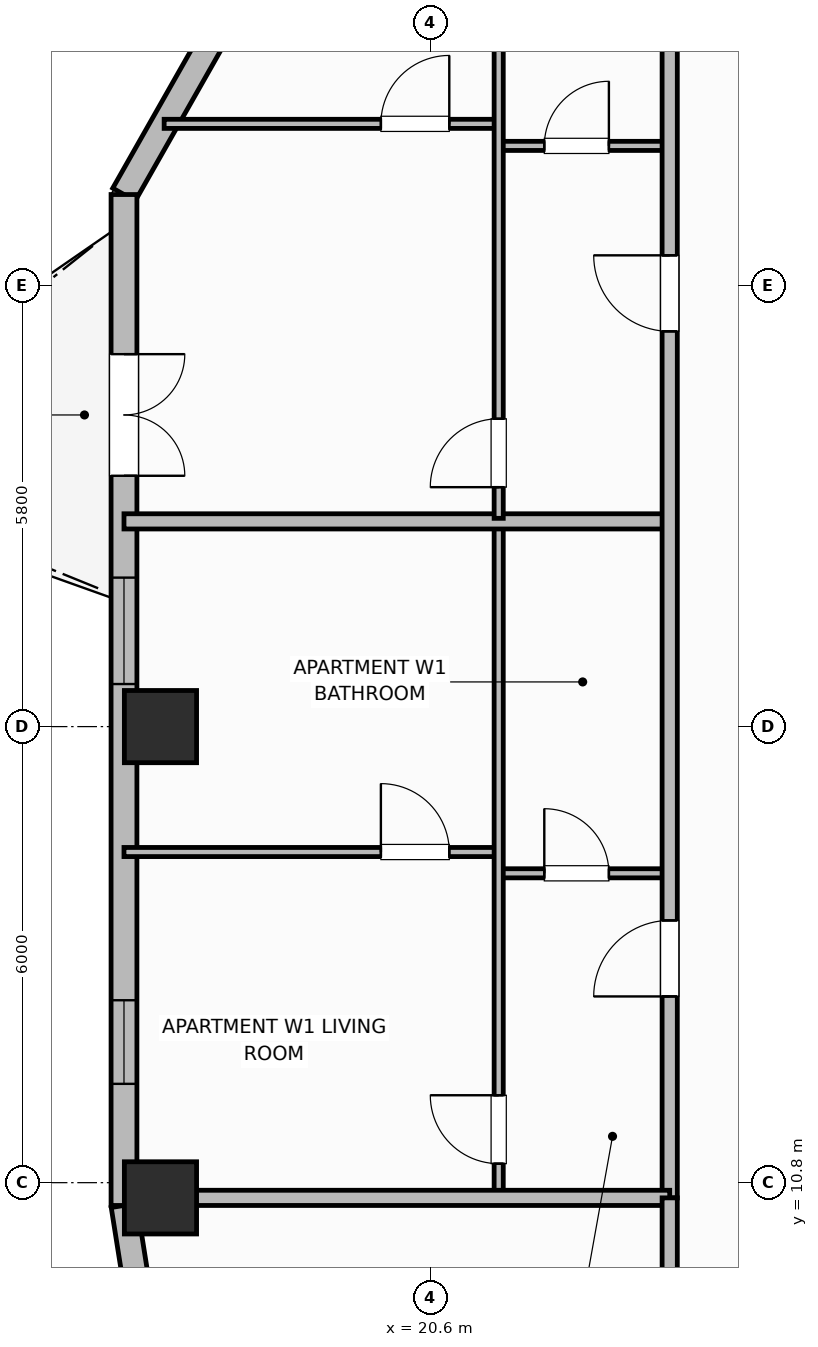
"""IFC4 building model, lengths in metres.
Left out: names, types, materials, properties, quantities, classifications, styles, units other than length and angle.
Written with IfcOpenShell. Run it as: python <this file> out.ifc"""

import sys

from ifc_helpers import new_model, si_unit, direction, frame, frame_2d, origin, origin_2d, place, context, subcontext, project, spatial, rectangle, extrude, element, fill, save


model = new_model("IFC4")
c1 = context("Model", 3, precision=1e-05, world=origin(), true_north=direction((0.0, 1.0)))
c2 = subcontext(c1, "Body", "Model", "MODEL_VIEW")
j1 = project(units=[si_unit("LENGTHUNIT", "METRE"), si_unit("PLANEANGLEUNIT", "RADIAN")], contexts=[c1])
p1 = place(None, origin())
s1 = spatial("IfcSite", under=j1, at=p1, CompositionType="ELEMENT")
p2 = place(p1, origin())
s2 = spatial("IfcBuilding", under=s1, at=p2, CompositionType="ELEMENT")
p3 = place(p2, frame((0.0, 0.0, 173.7)))
s3 = spatial("IfcBuildingStorey", under=s2, at=p3, CompositionType="ELEMENT", Elevation=173.7)
for number, where, z_axis, x_axis in (
    (1, (17.05, 10.6, 0.0), (0.0, 0.0, 1.0), (1.0, 0.0, 0.0)),
    (2, (17.05, 16.8, 0.0), (0.0, 0.0, 1.0), (1.0, 0.0, 0.0)),
):
    element("IfcColumn", number, at=place(p3, frame(where, z_axis=z_axis, x_axis=x_axis)), inside=s3, PredefinedType="COLUMN", context=c2, shape_type="SweptSolid", body=[
        extrude(rectangle(XDim=0.95, YDim=0.95, at=origin_2d()), origin(), (0.0, 0.0, 1.0), 3.7),
    ])
p4 = place(p3, frame((16.57, 10.5, 0.0), z_axis=(0.0, 0.0, 1.0), x_axis=(0.156514556949, -0.987675651954, 0.0)))
e3 = element("IfcWall", 3, at=p4, inside=s3, PredefinedType="SOLIDWALL", context=c2, shape_type="SweptSolid", body=[
    extrude(rectangle(XDim=1.135, YDim=0.34, at=frame_2d((0.568, 0.0))), origin(), (0.0, 0.0, 1.0), 2.72),
])
p5 = place(p3, frame((17.82, 26.0, 0.0), z_axis=(0.0, 0.0, 1.0), x_axis=(-0.494017696272, -0.869451847873, 0.0)))
e4 = element("IfcWall", 4, at=p5, inside=s3, PredefinedType="SOLIDWALL", context=c2, shape_type="SweptSolid", body=[
    extrude(rectangle(XDim=2.53, YDim=0.34, at=frame_2d((1.265, 0.0))), origin(), (0.0, 0.0, 1.0), 2.72),
])
p6 = place(p3, frame((16.57, 23.8, 0.0), z_axis=(0.0, 0.0, 1.0), x_axis=(0.0, -1.0, 0.0)))
e5 = element("IfcWall", 5, at=p6, inside=s3, PredefinedType="SOLIDWALL", context=c2, shape_type="SweptSolid", body=[
    extrude(rectangle(XDim=13.3, YDim=0.34, at=frame_2d((6.65, 0.0))), origin(), (0.0, 0.0, 1.0), 2.72),
])
p7 = place(p6, frame((2.1, 0.0, 0.0)))
e6 = element("IfcOpeningElement", 6, at=p7, cuts=e5, PredefinedType="OPENING", context=c2, shape_type="SweptSolid", body=[
    extrude(rectangle(XDim=1.6, YDim=2.1, at=frame_2d((0.8, 1.05))), frame((0.0, 0.18, 0.0), z_axis=(0.0, -1.0, 0.0), x_axis=(1.0, 0.0, 0.0)), (0.0, 0.0, 1.0), 0.36),
])
p8 = place(p6, frame((5.04, 0.0, 0.71)))
e7 = element("IfcOpeningElement", 7, at=p8, cuts=e5, PredefinedType="OPENING", context=c2, shape_type="SweptSolid", body=[
    extrude(rectangle(XDim=1.4, YDim=1.85, at=frame_2d((0.7, 0.925))), frame((0.0, 0.18, 0.0), z_axis=(0.0, -1.0, 0.0), x_axis=(1.0, 0.0, 0.0)), (0.0, 0.0, 1.0), 0.36),
])
p9 = place(p6, frame((10.6, 0.0, 0.95)))
e8 = element("IfcOpeningElement", 8, at=p9, cuts=e5, PredefinedType="OPENING", context=c2, shape_type="SweptSolid", body=[
    extrude(rectangle(XDim=1.1, YDim=1.65, at=frame_2d((0.55, 0.825))), frame((0.0, 0.18, 0.0), z_axis=(0.0, -1.0, 0.0), x_axis=(1.0, 0.0, 0.0)), (0.0, 0.0, 1.0), 0.36),
])
p10 = place(p3, frame((21.5, 14.87, 0.0), z_axis=(0.0, 0.0, 1.0), x_axis=(1.0, 0.0, 0.0)))
e9 = element("IfcWall", 9, at=p10, inside=s3, PredefinedType="PARTITIONING", context=c2, shape_type="SweptSolid", body=[
    extrude(rectangle(XDim=2.25, YDim=0.12, at=frame_2d((1.125, 0.0))), origin(), (0.0, 0.0, 1.0), 2.55),
])
p11 = place(p10, frame((0.6, 0.0, 0.0)))
e10 = element("IfcOpeningElement", 10, at=p11, cuts=e9, PredefinedType="OPENING", context=c2, shape_type="SweptSolid", body=[
    extrude(rectangle(XDim=0.85, YDim=2.1, at=frame_2d((0.425, 1.05))), frame((0.0, 0.07, 0.0), z_axis=(0.0, -1.0, 0.0), x_axis=(1.0, 0.0, 0.0)), (0.0, 0.0, 1.0), 0.14),
])
p12 = place(p3, frame((16.57, 15.15, 0.0), z_axis=(0.0, 0.0, 1.0), x_axis=(1.0, 0.0, 0.0)))
e11 = element("IfcWall", 11, at=p12, inside=s3, PredefinedType="PARTITIONING", context=c2, shape_type="SweptSolid", body=[
    extrude(rectangle(XDim=4.93, YDim=0.12, at=frame_2d((2.465, 0.0))), origin(), (0.0, 0.0, 1.0), 2.55),
])
p13 = place(p12, frame((3.38, 0.0, 0.0)))
e12 = element("IfcOpeningElement", 12, at=p13, cuts=e11, PredefinedType="OPENING", context=c2, shape_type="SweptSolid", body=[
    extrude(rectangle(XDim=0.9, YDim=2.1, at=frame_2d((0.45, 1.05))), frame((0.0, 0.07, 0.0), z_axis=(0.0, -1.0, 0.0), x_axis=(1.0, 0.0, 0.0)), (0.0, 0.0, 1.0), 0.14),
])
p14 = place(p3, frame((21.5, 10.64, 0.0), z_axis=(0.0, 0.0, 1.0), x_axis=(0.0, 1.0, 0.0)))
e13 = element("IfcWall", 13, at=p14, inside=s3, PredefinedType="PARTITIONING", context=c2, shape_type="SweptSolid", body=[
    extrude(rectangle(XDim=8.82, YDim=0.12, at=frame_2d((4.41, 0.0))), origin(), (0.0, 0.0, 1.0), 2.55),
])
p15 = place(p14, frame((0.41, 0.0, 0.0)))
e14 = element("IfcOpeningElement", 14, at=p15, cuts=e13, PredefinedType="OPENING", context=c2, shape_type="SweptSolid", body=[
    extrude(rectangle(XDim=0.9, YDim=2.1, at=frame_2d((0.45, 1.05))), frame((0.0, 0.07, 0.0), z_axis=(0.0, -1.0, 0.0), x_axis=(1.0, 0.0, 0.0)), (0.0, 0.0, 1.0), 0.14),
])
p16 = place(p3, frame((16.57, 19.5, 0.0), z_axis=(0.0, 0.0, 1.0), x_axis=(1.0, 0.0, 0.0)))
e15 = element("IfcWall", 15, at=p16, inside=s3, PredefinedType="PARTITIONING", context=c2, shape_type="SweptSolid", body=[
    extrude(rectangle(XDim=7.18, YDim=0.2, at=frame_2d((3.59, 0.0))), origin(), (0.0, 0.0, 1.0), 2.55),
])
p17 = place(p3, frame((21.5, 24.44, 0.0), z_axis=(0.0, 0.0, 1.0), x_axis=(1.0, 0.0, 0.0)))
e16 = element("IfcWall", 16, at=p17, inside=s3, PredefinedType="PARTITIONING", context=c2, shape_type="SweptSolid", body=[
    extrude(rectangle(XDim=2.25, YDim=0.12, at=frame_2d((1.125, 0.0))), origin(), (0.0, 0.0, 1.0), 2.55),
])
p18 = place(p17, frame((0.6, 0.0, 0.0)))
e17 = element("IfcOpeningElement", 17, at=p18, cuts=e16, PredefinedType="OPENING", context=c2, shape_type="SweptSolid", body=[
    extrude(rectangle(XDim=0.85, YDim=2.1, at=frame_2d((0.425, 1.05))), frame((0.0, 0.07, 0.0), z_axis=(0.0, -1.0, 0.0), x_axis=(1.0, 0.0, 0.0)), (0.0, 0.0, 1.0), 0.14),
])
p19 = place(p3, frame((17.098, 24.73, 0.0), z_axis=(0.0, 0.0, 1.0), x_axis=(1.0, 0.0, 0.0)))
e18 = element("IfcWall", 18, at=p19, inside=s3, PredefinedType="PARTITIONING", context=c2, shape_type="SweptSolid", body=[
    extrude(rectangle(XDim=4.402, YDim=0.12, at=frame_2d((2.201, 0.0))), origin(), (0.0, 0.0, 1.0), 2.55),
])
p20 = place(p19, frame((2.852, 0.0, 0.0)))
e19 = element("IfcOpeningElement", 19, at=p20, cuts=e18, PredefinedType="OPENING", context=c2, shape_type="SweptSolid", body=[
    extrude(rectangle(XDim=0.9, YDim=2.1, at=frame_2d((0.45, 1.05))), frame((0.0, 0.07, 0.0), z_axis=(0.0, -1.0, 0.0), x_axis=(1.0, 0.0, 0.0)), (0.0, 0.0, 1.0), 0.14),
])
p21 = place(p3, frame((21.5, 19.54, 0.0), z_axis=(0.0, 0.0, 1.0), x_axis=(0.0, 1.0, 0.0)))
e20 = element("IfcWall", 20, at=p21, inside=s3, PredefinedType="PARTITIONING", context=c2, shape_type="SweptSolid", body=[
    extrude(rectangle(XDim=10.22, YDim=0.12, at=frame_2d((5.11, 0.0))), origin(), (0.0, 0.0, 1.0), 2.55),
])
p22 = place(p21, frame((0.41, 0.0, 0.0)))
e21 = element("IfcOpeningElement", 21, at=p22, cuts=e20, PredefinedType="OPENING", context=c2, shape_type="SweptSolid", body=[
    extrude(rectangle(XDim=0.9, YDim=2.1, at=frame_2d((0.45, 1.05))), frame((0.0, 0.07, 0.0), z_axis=(0.0, -1.0, 0.0), x_axis=(1.0, 0.0, 0.0)), (0.0, 0.0, 1.0), 0.14),
])
p23 = place(p3, frame((23.75, 10.6, 0.0), z_axis=(0.0, 0.0, 1.0), x_axis=(0.0, 1.0, 0.0)))
e22 = element("IfcWall", 22, at=p23, inside=s3, PredefinedType="PARTITIONING", context=c2, shape_type="SweptSolid", body=[
    extrude(rectangle(XDim=35.2, YDim=0.2, at=frame_2d((17.6, 0.0))), origin(), (0.0, 0.0, 1.0), 2.55),
])
p24 = place(p23, frame((2.65, 0.0, 0.0)))
e23 = element("IfcOpeningElement", 23, at=p24, cuts=e22, PredefinedType="OPENING", context=c2, shape_type="SweptSolid", body=[
    extrude(rectangle(XDim=1.0, YDim=2.15, at=frame_2d((0.5, 1.075))), frame((0.0, 0.11, 0.0), z_axis=(0.0, -1.0, 0.0), x_axis=(1.0, 0.0, 0.0)), (0.0, 0.0, 1.0), 0.22),
])
p25 = place(p23, frame((11.4, 0.0, 0.0)))
e24 = element("IfcOpeningElement", 24, at=p25, cuts=e22, PredefinedType="OPENING", context=c2, shape_type="SweptSolid", body=[
    extrude(rectangle(XDim=1.0, YDim=2.15, at=frame_2d((0.5, 1.075))), frame((0.0, 0.11, 0.0), z_axis=(0.0, -1.0, 0.0), x_axis=(1.0, 0.0, 0.0)), (0.0, 0.0, 1.0), 0.22),
])
p26 = place(p23, frame((21.37, 0.0, 0.0)))
e25 = element("IfcOpeningElement", 25, at=p26, cuts=e22, PredefinedType="OPENING", context=c2, shape_type="SweptSolid", body=[
    extrude(rectangle(XDim=1.0, YDim=2.15, at=frame_2d((0.5, 1.075))), frame((0.0, 0.11, 0.0), z_axis=(0.0, -1.0, 0.0), x_axis=(1.0, 0.0, 0.0)), (0.0, 0.0, 1.0), 0.22),
])
p27 = place(p23, frame((27.302, 0.0, 0.0)))
e26 = element("IfcOpeningElement", 26, at=p27, cuts=e22, PredefinedType="OPENING", context=c2, shape_type="SweptSolid", body=[
    extrude(rectangle(XDim=1.0, YDim=2.15, at=frame_2d((0.5, 1.075))), frame((0.0, 0.11, 0.0), z_axis=(0.0, -1.0, 0.0), x_axis=(1.0, 0.0, 0.0)), (0.0, 0.0, 1.0), 0.22),
])
p28 = place(p3, frame((16.99, 10.6, 0.0), z_axis=(0.0, 0.0, 1.0), x_axis=(1.0, 0.0, 0.0)))
e27 = element("IfcWall", 27, at=p28, inside=s3, PredefinedType="PARTITIONING", context=c2, shape_type="SweptSolid", body=[
    extrude(rectangle(XDim=6.76, YDim=0.2, at=frame_2d((3.38, 0.0))), origin(), (0.0, 0.0, 1.0), 2.55),
])
p29 = place(p3, frame((23.75, 6.87, 0.0), z_axis=(0.0, 0.0, 1.0), x_axis=(0.0, 1.0, 0.0)))
e28 = element("IfcWall", 28, at=p29, inside=s3, PredefinedType="PARTITIONING", context=c2, shape_type="SweptSolid", body=[
    extrude(rectangle(XDim=3.73, YDim=0.2, at=frame_2d((1.865, 0.0))), origin(), (0.0, 0.0, 1.0), 2.55),
])
p30 = place(p7, origin())
e29 = element("IfcDoor", 29, at=p30, inside=s3, OperationType="DOUBLE_DOOR_SINGLE_SWING", PredefinedType="DOOR", context=c2, shape_type="SweptSolid", body=[
    extrude(rectangle(XDim=1.6, YDim=2.1, at=frame_2d((0.8, 1.05))), frame((0.0, 0.025, 0.0), z_axis=(0.0, -1.0, 0.0), x_axis=(1.0, 0.0, 0.0)), (0.0, 0.0, 1.0), 0.05),
])
fill(e6, e29)
p31 = place(p8, origin())
e30 = element("IfcWindow", 30, at=p31, inside=s3, PartitioningType="SINGLE_PANEL", PredefinedType="WINDOW", context=c2, shape_type="SweptSolid", body=[
    extrude(rectangle(XDim=1.4, YDim=1.85, at=frame_2d((0.7, 0.925))), frame((0.0, 0.03, 0.0), z_axis=(0.0, -1.0, 0.0), x_axis=(1.0, 0.0, 0.0)), (0.0, 0.0, 1.0), 0.06),
])
fill(e7, e30)
p32 = place(p9, origin())
e31 = element("IfcWindow", 31, at=p32, inside=s3, PartitioningType="SINGLE_PANEL", PredefinedType="WINDOW", context=c2, shape_type="SweptSolid", body=[
    extrude(rectangle(XDim=1.1, YDim=1.65, at=frame_2d((0.55, 0.825))), frame((0.0, 0.03, 0.0), z_axis=(0.0, -1.0, 0.0), x_axis=(1.0, 0.0, 0.0)), (0.0, 0.0, 1.0), 0.06),
])
fill(e8, e31)
p33 = place(p11, origin())
e32 = element("IfcDoor", 32, at=p33, inside=s3, OperationType="SINGLE_SWING_LEFT", PredefinedType="DOOR", context=c2, shape_type="SweptSolid", body=[
    extrude(rectangle(XDim=0.85, YDim=2.1, at=frame_2d((0.425, 1.05))), frame((0.0, 0.025, 0.0), z_axis=(0.0, -1.0, 0.0), x_axis=(1.0, 0.0, 0.0)), (0.0, 0.0, 1.0), 0.05),
])
fill(e10, e32)
p34 = place(p13, origin())
e33 = element("IfcDoor", 33, at=p34, inside=s3, OperationType="SINGLE_SWING_LEFT", PredefinedType="DOOR", context=c2, shape_type="SweptSolid", body=[
    extrude(rectangle(XDim=0.9, YDim=2.1, at=frame_2d((0.45, 1.05))), frame((0.0, 0.025, 0.0), z_axis=(0.0, -1.0, 0.0), x_axis=(1.0, 0.0, 0.0)), (0.0, 0.0, 1.0), 0.05),
])
fill(e12, e33)
p35 = place(p15, origin())
e34 = element("IfcDoor", 34, at=p35, inside=s3, OperationType="SINGLE_SWING_RIGHT", PredefinedType="DOOR", context=c2, shape_type="SweptSolid", body=[
    extrude(rectangle(XDim=0.9, YDim=2.1, at=frame_2d((0.45, 1.05))), frame((0.0, 0.025, 0.0), z_axis=(0.0, -1.0, 0.0), x_axis=(1.0, 0.0, 0.0)), (0.0, 0.0, 1.0), 0.05),
])
fill(e14, e34)
p36 = place(p18, origin())
e35 = element("IfcDoor", 35, at=p36, inside=s3, OperationType="SINGLE_SWING_RIGHT", PredefinedType="DOOR", context=c2, shape_type="SweptSolid", body=[
    extrude(rectangle(XDim=0.85, YDim=2.1, at=frame_2d((0.425, 1.05))), frame((0.0, 0.025, 0.0), z_axis=(0.0, -1.0, 0.0), x_axis=(1.0, 0.0, 0.0)), (0.0, 0.0, 1.0), 0.05),
])
fill(e17, e35)
p37 = place(p20, origin())
e36 = element("IfcDoor", 36, at=p37, inside=s3, OperationType="SINGLE_SWING_RIGHT", PredefinedType="DOOR", context=c2, shape_type="SweptSolid", body=[
    extrude(rectangle(XDim=0.9, YDim=2.1, at=frame_2d((0.45, 1.05))), frame((0.0, 0.025, 0.0), z_axis=(0.0, -1.0, 0.0), x_axis=(1.0, 0.0, 0.0)), (0.0, 0.0, 1.0), 0.05),
])
fill(e19, e36)
p38 = place(p22, origin())
e37 = element("IfcDoor", 37, at=p38, inside=s3, OperationType="SINGLE_SWING_LEFT", PredefinedType="DOOR", context=c2, shape_type="SweptSolid", body=[
    extrude(rectangle(XDim=0.9, YDim=2.1, at=frame_2d((0.45, 1.05))), frame((0.0, 0.025, 0.0), z_axis=(0.0, -1.0, 0.0), x_axis=(1.0, 0.0, 0.0)), (0.0, 0.0, 1.0), 0.05),
])
fill(e21, e37)
p39 = place(p24, origin())
e38 = element("IfcDoor", 38, at=p39, inside=s3, OperationType="SINGLE_SWING_LEFT", PredefinedType="DOOR", context=c2, shape_type="SweptSolid", body=[
    extrude(rectangle(XDim=1.0, YDim=2.15, at=frame_2d((0.5, 1.075))), frame((0.0, 0.025, 0.0), z_axis=(0.0, -1.0, 0.0), x_axis=(1.0, 0.0, 0.0)), (0.0, 0.0, 1.0), 0.05),
])
fill(e23, e38)
p40 = place(p25, origin())
e39 = element("IfcDoor", 39, at=p40, inside=s3, OperationType="SINGLE_SWING_RIGHT", PredefinedType="DOOR", context=c2, shape_type="SweptSolid", body=[
    extrude(rectangle(XDim=1.0, YDim=2.15, at=frame_2d((0.5, 1.075))), frame((0.0, 0.025, 0.0), z_axis=(0.0, -1.0, 0.0), x_axis=(1.0, 0.0, 0.0)), (0.0, 0.0, 1.0), 0.05),
])
fill(e24, e39)
save(model, sys.argv[1])
